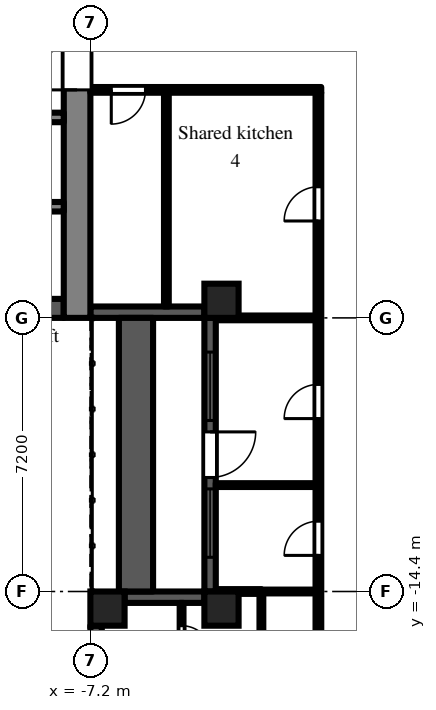
"""IFC4 building model, lengths in metres.
Left out: names, types, materials, properties, quantities, classifications, styles, units other than length and angle.
Written with IfcOpenShell. Run it as: python <this file> out.ifc"""

import sys

from ifc_helpers import new_model, si_unit, direction, frame, frame_2d, origin, origin_2d, place, context, subcontext, project, spatial, rectangle, extrude, element, fill, save


model = new_model("IFC4")
c1 = context("Model", 3, precision=1e-05, world=origin(), true_north=direction((0.0, 1.0)))
c2 = subcontext(c1, "Body", "Model", "MODEL_VIEW")
j1 = project(units=[si_unit("LENGTHUNIT", "METRE"), si_unit("PLANEANGLEUNIT", "RADIAN")], contexts=[c1])
p1 = place(None, origin())
s1 = spatial("IfcSite", under=j1, at=p1, CompositionType="ELEMENT")
p2 = place(p1, origin())
s2 = spatial("IfcBuilding", under=s1, at=p2, CompositionType="ELEMENT")
p3 = place(p2, frame((0.0, 0.0, 69.9)))
s3 = spatial("IfcBuildingStorey", under=s2, at=p3, CompositionType="ELEMENT", Elevation=69.9)
for number, where, z_axis, x_axis in (
    (1, (-6.75, -14.85, 0.0), (0.0, 0.0, 1.0), (1.0, 0.0, 0.0)),
    (2, (-3.75, -14.85, 0.0), (0.0, 0.0, 1.0), (1.0, 0.0, 0.0)),
    (3, (-3.75, -6.75, 0.0), (0.0, 0.0, 1.0), (1.0, 0.0, 0.0)),
):
    element("IfcColumn", number, at=place(p3, frame(where, z_axis=z_axis, x_axis=x_axis)), inside=s3, PredefinedType="COLUMN", context=c2, shape_type="SweptSolid", body=[
        extrude(rectangle(XDim=0.9, YDim=0.9, at=origin_2d()), origin(), (0.0, 0.0, 1.0), 3.0),
    ])
p4 = place(p3, frame((-7.2, -7.05, 0.0), z_axis=(0.0, 0.0, 1.0), x_axis=(1.0, 0.0, 0.0)))
e4 = element("IfcWall", 4, at=p4, inside=s3, PredefinedType="SOLIDWALL", context=c2, shape_type="SweptSolid", body=[
    extrude(rectangle(XDim=3.0, YDim=0.3, at=frame_2d((1.5, 0.0))), origin(), (0.0, 0.0, 1.0), 2.1),
])
p5 = place(p3, frame((-4.05, -7.2, 0.0), z_axis=(0.0, 0.0, 1.0), x_axis=(0.0, -1.0, 0.0)))
e5 = element("IfcWall", 5, at=p5, inside=s3, PredefinedType="SOLIDWALL", context=c2, shape_type="SweptSolid", body=[
    extrude(rectangle(XDim=7.2, YDim=0.3, at=frame_2d((3.6, 0.0))), origin(), (0.0, 0.0, 1.0), 2.1),
])
p6 = place(p5, frame((3.0, 0.0, 0.0)))
e6 = element("IfcOpeningElement", 6, at=p6, cuts=e5, PredefinedType="OPENING", context=c2, shape_type="SweptSolid", body=[
    extrude(rectangle(XDim=1.2, YDim=2.05, at=frame_2d((0.6, 1.025))), frame((0.0, 0.16, 0.0), z_axis=(0.0, -1.0, 0.0), x_axis=(1.0, 0.0, 0.0)), (0.0, 0.0, 1.0), 0.32),
])
p7 = place(p5, frame((0.9, 0.0, 0.2)))
e7 = element("IfcOpeningElement", 7, at=p7, cuts=e5, PredefinedType="OPENING", context=c2, shape_type="SweptSolid", body=[
    extrude(rectangle(XDim=1.8, YDim=1.85, at=frame_2d((0.9, 0.925))), frame((0.0, 0.16, 0.0), z_axis=(0.0, -1.0, 0.0), x_axis=(1.0, 0.0, 0.0)), (0.0, 0.0, 1.0), 0.32),
])
p8 = place(p5, frame((4.5, 0.0, 0.2)))
e8 = element("IfcOpeningElement", 8, at=p8, cuts=e5, PredefinedType="OPENING", context=c2, shape_type="SweptSolid", body=[
    extrude(rectangle(XDim=1.8, YDim=1.85, at=frame_2d((0.9, 0.925))), frame((0.0, 0.16, 0.0), z_axis=(0.0, -1.0, 0.0), x_axis=(1.0, 0.0, 0.0)), (0.0, 0.0, 1.0), 0.32),
])
p9 = place(p3, frame((-4.2, -14.55, 0.0), z_axis=(0.0, 0.0, 1.0), x_axis=(-1.0, 0.0, 0.0)))
e9 = element("IfcWall", 9, at=p9, inside=s3, PredefinedType="SOLIDWALL", context=c2, shape_type="SweptSolid", body=[
    extrude(rectangle(XDim=2.1, YDim=0.3, at=frame_2d((1.05, 0.0))), origin(), (0.0, 0.0, 1.0), 2.1),
])
p10 = place(p3, frame((-7.05, -15.3, 0.0), z_axis=(0.0, 0.0, 1.0), x_axis=(0.0, -1.0, 0.0)))
e10 = element("IfcWall", 10, at=p10, inside=s3, PredefinedType="SOLIDWALL", context=c2, shape_type="SweptSolid", body=[
    extrude(rectangle(XDim=1.8, YDim=0.3, at=frame_2d((0.9, 0.0))), origin(), (0.0, 0.0, 1.0), 2.1),
])
p11 = place(p10, frame((0.3, 0.0, 0.2)))
e11 = element("IfcOpeningElement", 11, at=p11, cuts=e10, PredefinedType="OPENING", context=c2, shape_type="SweptSolid", body=[
    extrude(rectangle(XDim=1.2, YDim=1.85, at=frame_2d((0.6, 0.925))), frame((0.0, 0.16, 0.0), z_axis=(0.0, -1.0, 0.0), x_axis=(1.0, 0.0, 0.0)), (0.0, 0.0, 1.0), 0.32),
])
p12 = place(p3, frame((-6.0, -14.4, 0.0), z_axis=(0.0, 0.0, 1.0), x_axis=(0.0, 1.0, 0.0)))
e12 = element("IfcWall", 12, at=p12, inside=s3, PredefinedType="PARAPET", context=c2, shape_type="SweptSolid", body=[
    extrude(rectangle(XDim=7.2, YDim=0.9, at=frame_2d((3.6, 0.0))), origin(), (0.0, 0.0, 1.0), 0.8),
])
p13 = place(p3, frame((-7.55, -7.2, 0.0), z_axis=(0.0, 0.0, 1.0), x_axis=(0.0, 1.0, 0.0)))
e13 = element("IfcWall", 13, at=p13, inside=s3, PredefinedType="SHEAR", context=c2, shape_type="SweptSolid", body=[
    extrude(rectangle(XDim=14.4, YDim=0.7, at=frame_2d((7.2, 0.0))), origin(), (0.0, 0.0, 1.0), 2.575),
])
p14 = place(p13, frame((6.0, 0.0, 0.0)))
e14 = element("IfcOpeningElement", 14, at=p14, cuts=e13, PredefinedType="OPENING", context=c2, shape_type="SweptSolid", body=[
    extrude(rectangle(XDim=2.4, YDim=2.2, at=frame_2d((1.2, 1.1))), frame((0.0, 0.36, 0.0), z_axis=(0.0, -1.0, 0.0), x_axis=(1.0, 0.0, 0.0)), (0.0, 0.0, 1.0), 0.72),
])
p15 = place(p3, frame((-7.9, -6.95, 0.0), z_axis=(0.0, 0.0, 1.0), x_axis=(-1.0, 0.0, 0.0)))
e15 = element("IfcWall", 15, at=p15, inside=s3, PredefinedType="SHEAR", context=c2, shape_type="SweptSolid", body=[
    extrude(rectangle(XDim=12.95, YDim=0.5, at=frame_2d((6.475, 0.0))), origin(), (0.0, 0.0, 1.0), 2.575),
])
p16 = place(p3, frame((-7.9, -1.925, 0.0), z_axis=(0.0, 0.0, 1.0), x_axis=(-1.0, 0.0, 0.0)))
e16 = element("IfcWall", 16, at=p16, inside=s3, PredefinedType="SHEAR", context=c2, shape_type="SweptSolid", body=[
    extrude(rectangle(XDim=12.95, YDim=0.25, at=frame_2d((6.475, 0.0))), origin(), (0.0, 0.0, 1.0), 2.575),
])
p17 = place(p16, frame((4.825, 0.0, 0.0)))
e17 = element("IfcOpeningElement", 17, at=p17, cuts=e16, PredefinedType="OPENING", context=c2, shape_type="SweptSolid", body=[
    extrude(rectangle(XDim=1.1, YDim=2.1, at=frame_2d((0.55, 1.05))), frame((0.0, 0.135, 0.0), z_axis=(0.0, -1.0, 0.0), x_axis=(1.0, 0.0, 0.0)), (0.0, 0.0, 1.0), 0.27),
])
p18 = place(p16, frame((7.025, 0.0, 0.0)))
e18 = element("IfcOpeningElement", 18, at=p18, cuts=e16, PredefinedType="OPENING", context=c2, shape_type="SweptSolid", body=[
    extrude(rectangle(XDim=1.1, YDim=2.1, at=frame_2d((0.55, 1.05))), frame((0.0, 0.135, 0.0), z_axis=(0.0, -1.0, 0.0), x_axis=(1.0, 0.0, 0.0)), (0.0, 0.0, 1.0), 0.27),
])
p19 = place(p16, frame((9.225, 0.0, 0.0)))
e19 = element("IfcOpeningElement", 19, at=p19, cuts=e16, PredefinedType="OPENING", context=c2, shape_type="SweptSolid", body=[
    extrude(rectangle(XDim=1.1, YDim=2.1, at=frame_2d((0.55, 1.05))), frame((0.0, 0.135, 0.0), z_axis=(0.0, -1.0, 0.0), x_axis=(1.0, 0.0, 0.0)), (0.0, 0.0, 1.0), 0.27),
])
p20 = place(p16, frame((0.525, 0.0, 0.0)))
e20 = element("IfcOpeningElement", 20, at=p20, cuts=e16, PredefinedType="OPENING", context=c2, shape_type="SweptSolid", body=[
    extrude(rectangle(XDim=0.9, YDim=2.1, at=frame_2d((0.45, 1.05))), frame((0.0, 0.135, 0.0), z_axis=(0.0, -1.0, 0.0), x_axis=(1.0, 0.0, 0.0)), (0.0, 0.0, 1.0), 0.27),
])
p21 = place(p16, frame((2.625, 0.0, 0.0)))
e21 = element("IfcOpeningElement", 21, at=p21, cuts=e16, PredefinedType="OPENING", context=c2, shape_type="SweptSolid", body=[
    extrude(rectangle(XDim=1.1, YDim=2.1, at=frame_2d((0.55, 1.05))), frame((0.0, 0.135, 0.0), z_axis=(0.0, -1.0, 0.0), x_axis=(1.0, 0.0, 0.0)), (0.0, 0.0, 1.0), 0.27),
])
p22 = place(p3, frame((-7.9, -4.275, 0.0), z_axis=(0.0, 0.0, 1.0), x_axis=(-1.0, 0.0, 0.0)))
e22 = element("IfcWall", 22, at=p22, inside=s3, PredefinedType="SHEAR", context=c2, shape_type="SweptSolid", body=[
    extrude(rectangle(XDim=1.95, YDim=0.25, at=frame_2d((0.975, 0.0))), origin(), (0.0, 0.0, 1.0), 2.575),
])
p23 = place(p3, frame((-7.2, -1.2, 0.0), z_axis=(0.0, 0.0, 1.0), x_axis=(1.0, 0.0, 0.0)))
e23 = element("IfcWall", 23, at=p23, inside=s3, PredefinedType="PARTITIONING", context=c2, shape_type="SweptSolid", body=[
    extrude(rectangle(XDim=6.075, YDim=0.15, at=frame_2d((3.038, 0.0))), origin(), (0.0, 0.0, 1.0), 2.575),
])
p24 = place(p23, frame((0.55, 0.0, 0.0)))
e24 = element("IfcOpeningElement", 24, at=p24, cuts=e23, PredefinedType="OPENING", context=c2, shape_type="SweptSolid", body=[
    extrude(rectangle(XDim=0.9, YDim=2.1, at=frame_2d((0.45, 1.05))), frame((0.0, 0.085, 0.0), z_axis=(0.0, -1.0, 0.0), x_axis=(1.0, 0.0, 0.0)), (0.0, 0.0, 1.0), 0.17),
])
p25 = place(p3, frame((-5.2, -6.9, 0.0), z_axis=(0.0, 0.0, 1.0), x_axis=(0.0, 1.0, 0.0)))
e25 = element("IfcWall", 25, at=p25, inside=s3, PredefinedType="PARTITIONING", context=c2, shape_type="SweptSolid", body=[
    extrude(rectangle(XDim=5.625, YDim=0.125, at=frame_2d((2.812, 0.0))), origin(), (0.0, 0.0, 1.0), 2.575),
])
p26 = place(p3, frame((-4.8, -16.25, 0.0), z_axis=(0.0, 0.0, 1.0), x_axis=(0.0, 1.0, 0.0)))
e26 = element("IfcWall", 26, at=p26, inside=s3, PredefinedType="PARTITIONING", context=c2, shape_type="SweptSolid", body=[
    extrude(rectangle(XDim=1.55, YDim=0.1, at=frame_2d((0.775, 0.0))), origin(), (0.0, 0.0, 1.0), 2.575),
])
p27 = place(p26, frame((0.15, 0.0, 0.0)))
e27 = element("IfcOpeningElement", 27, at=p27, cuts=e26, PredefinedType="OPENING", context=c2, shape_type="SweptSolid", body=[
    extrude(rectangle(XDim=0.8, YDim=2.1, at=frame_2d((0.4, 1.05))), frame((0.0, 0.06, 0.0), z_axis=(0.0, -1.0, 0.0), x_axis=(1.0, 0.0, 0.0)), (0.0, 0.0, 1.0), 0.12),
])
p28 = place(p3, frame((-3.9, -14.4, 0.0), z_axis=(0.0, 0.0, 1.0), x_axis=(1.0, 0.0, 0.0)))
e28 = element("IfcWall", 28, at=p28, inside=s3, PredefinedType="PARTITIONING", context=c2, shape_type="SweptSolid", body=[
    extrude(rectangle(XDim=1.2, YDim=0.125, at=frame_2d((0.6, 0.0))), origin(), (0.0, 0.0, 1.0), 2.575),
])
p29 = place(p3, frame((-3.9, -11.6, 0.0), z_axis=(0.0, 0.0, 1.0), x_axis=(1.0, 0.0, 0.0)))
e29 = element("IfcWall", 29, at=p29, inside=s3, PredefinedType="PARTITIONING", context=c2, shape_type="SweptSolid", body=[
    extrude(rectangle(XDim=2.625, YDim=0.1, at=frame_2d((1.312, 0.0))), origin(), (0.0, 0.0, 1.0), 2.575),
])
p30 = place(p3, frame((-3.9, -7.2, 0.0), z_axis=(0.0, 0.0, 1.0), x_axis=(1.0, 0.0, 0.0)))
e30 = element("IfcWall", 30, at=p30, inside=s3, PredefinedType="PARTITIONING", context=c2, shape_type="SweptSolid", body=[
    extrude(rectangle(XDim=2.625, YDim=0.125, at=frame_2d((1.312, 0.0))), origin(), (0.0, 0.0, 1.0), 2.575),
])
p31 = place(p3, frame((-2.7, -32.35, 0.0), z_axis=(0.0, 0.0, 1.0), x_axis=(0.0, 1.0, 0.0)))
e31 = element("IfcWall", 31, at=p31, inside=s3, PredefinedType="PARTITIONING", context=c2, shape_type="SweptSolid", body=[
    extrude(rectangle(XDim=17.888, YDim=0.1, at=frame_2d((8.944, 0.0))), origin(), (0.0, 0.0, 1.0), 2.575),
])
p32 = place(p31, frame((2.2, 0.0, 0.0)))
e32 = element("IfcOpeningElement", 32, at=p32, cuts=e31, PredefinedType="OPENING", context=c2, shape_type="SweptSolid", body=[
    extrude(rectangle(XDim=0.9, YDim=2.1, at=frame_2d((0.45, 1.05))), frame((0.0, 0.06, 0.0), z_axis=(0.0, -1.0, 0.0), x_axis=(1.0, 0.0, 0.0)), (0.0, 0.0, 1.0), 0.12),
])
p33 = place(p31, frame((4.0, 0.0, 0.0)))
e33 = element("IfcOpeningElement", 33, at=p33, cuts=e31, PredefinedType="OPENING", context=c2, shape_type="SweptSolid", body=[
    extrude(rectangle(XDim=0.9, YDim=2.1, at=frame_2d((0.45, 1.05))), frame((0.0, 0.06, 0.0), z_axis=(0.0, -1.0, 0.0), x_axis=(1.0, 0.0, 0.0)), (0.0, 0.0, 1.0), 0.12),
])
p34 = place(p31, frame((9.4, 0.0, 0.0)))
e34 = element("IfcOpeningElement", 34, at=p34, cuts=e31, PredefinedType="OPENING", context=c2, shape_type="SweptSolid", body=[
    extrude(rectangle(XDim=0.9, YDim=2.1, at=frame_2d((0.45, 1.05))), frame((0.0, 0.06, 0.0), z_axis=(0.0, -1.0, 0.0), x_axis=(1.0, 0.0, 0.0)), (0.0, 0.0, 1.0), 0.12),
])
p35 = place(p31, frame((11.2, 0.0, 0.0)))
e35 = element("IfcOpeningElement", 35, at=p35, cuts=e31, PredefinedType="OPENING", context=c2, shape_type="SweptSolid", body=[
    extrude(rectangle(XDim=0.9, YDim=2.1, at=frame_2d((0.45, 1.05))), frame((0.0, 0.06, 0.0), z_axis=(0.0, -1.0, 0.0), x_axis=(1.0, 0.0, 0.0)), (0.0, 0.0, 1.0), 0.12),
])
p36 = place(p31, frame((14.8, 0.0, 0.0)))
e36 = element("IfcOpeningElement", 36, at=p36, cuts=e31, PredefinedType="OPENING", context=c2, shape_type="SweptSolid", body=[
    extrude(rectangle(XDim=0.9, YDim=2.1, at=frame_2d((0.45, 1.05))), frame((0.0, 0.06, 0.0), z_axis=(0.0, -1.0, 0.0), x_axis=(1.0, 0.0, 0.0)), (0.0, 0.0, 1.0), 0.12),
])
p37 = place(p3, frame((-2.7, -14.4, 0.0), z_axis=(0.0, 0.0, 1.0), x_axis=(1.0, 0.0, 0.0)))
e37 = element("IfcWall", 37, at=p37, inside=s3, PredefinedType="PARTITIONING", context=c2, shape_type="SweptSolid", body=[
    extrude(rectangle(XDim=1.425, YDim=0.1, at=frame_2d((0.712, 0.0))), origin(), (0.0, 0.0, 1.0), 2.575),
])
p38 = place(p3, frame((-1.2, -36.5, 0.0), z_axis=(0.0, 0.0, 1.0), x_axis=(0.0, 1.0, 0.0)))
e38 = element("IfcWall", 38, at=p38, inside=s3, PredefinedType="PARTITIONING", context=c2, shape_type="SweptSolid", body=[
    extrude(rectangle(XDim=35.225, YDim=0.15, at=frame_2d((17.613, 0.0))), origin(), (0.0, 0.0, 1.0), 2.575),
])
p39 = place(p38, frame((31.85, 0.0, 0.0)))
e39 = element("IfcOpeningElement", 39, at=p39, cuts=e38, PredefinedType="OPENING", context=c2, shape_type="SweptSolid", body=[
    extrude(rectangle(XDim=0.9, YDim=2.1, at=frame_2d((0.45, 1.05))), frame((0.0, 0.085, 0.0), z_axis=(0.0, -1.0, 0.0), x_axis=(1.0, 0.0, 0.0)), (0.0, 0.0, 1.0), 0.17),
])
p40 = place(p38, frame((23.05, 0.0, 0.0)))
e40 = element("IfcOpeningElement", 40, at=p40, cuts=e38, PredefinedType="OPENING", context=c2, shape_type="SweptSolid", body=[
    extrude(rectangle(XDim=0.9, YDim=2.1, at=frame_2d((0.45, 1.05))), frame((0.0, 0.085, 0.0), z_axis=(0.0, -1.0, 0.0), x_axis=(1.0, 0.0, 0.0)), (0.0, 0.0, 1.0), 0.17),
])
p41 = place(p38, frame((26.65, 0.0, 0.0)))
e41 = element("IfcOpeningElement", 41, at=p41, cuts=e38, PredefinedType="OPENING", context=c2, shape_type="SweptSolid", body=[
    extrude(rectangle(XDim=0.9, YDim=2.1, at=frame_2d((0.45, 1.05))), frame((0.0, 0.085, 0.0), z_axis=(0.0, -1.0, 0.0), x_axis=(1.0, 0.0, 0.0)), (0.0, 0.0, 1.0), 0.17),
])
p42 = place(p38, frame((1.55, 0.0, 0.0)))
e42 = element("IfcOpeningElement", 42, at=p42, cuts=e38, PredefinedType="OPENING", context=c2, shape_type="SweptSolid", body=[
    extrude(rectangle(XDim=1.0, YDim=2.1, at=frame_2d((0.5, 1.05))), frame((0.0, 0.085, 0.0), z_axis=(0.0, -1.0, 0.0), x_axis=(1.0, 0.0, 0.0)), (0.0, 0.0, 1.0), 0.17),
])
p43 = place(p6, origin())
e43 = element("IfcDoor", 43, at=p43, inside=s3, OperationType="SINGLE_SWING_LEFT", PredefinedType="DOOR", context=c2, shape_type="SweptSolid", body=[
    extrude(rectangle(XDim=1.2, YDim=2.05, at=frame_2d((0.6, 1.025))), frame((0.0, 0.025, 0.0), z_axis=(0.0, -1.0, 0.0), x_axis=(1.0, 0.0, 0.0)), (0.0, 0.0, 1.0), 0.05),
])
fill(e6, e43)
p44 = place(p7, origin())
e44 = element("IfcWindow", 44, at=p44, inside=s3, PartitioningType="SINGLE_PANEL", PredefinedType="WINDOW", context=c2, shape_type="SweptSolid", body=[
    extrude(rectangle(XDim=1.8, YDim=1.85, at=frame_2d((0.9, 0.925))), frame((0.0, 0.03, 0.0), z_axis=(0.0, -1.0, 0.0), x_axis=(1.0, 0.0, 0.0)), (0.0, 0.0, 1.0), 0.06),
])
fill(e7, e44)
p45 = place(p8, origin())
e45 = element("IfcWindow", 45, at=p45, inside=s3, PartitioningType="SINGLE_PANEL", PredefinedType="WINDOW", context=c2, shape_type="SweptSolid", body=[
    extrude(rectangle(XDim=1.8, YDim=1.85, at=frame_2d((0.9, 0.925))), frame((0.0, 0.03, 0.0), z_axis=(0.0, -1.0, 0.0), x_axis=(1.0, 0.0, 0.0)), (0.0, 0.0, 1.0), 0.06),
])
fill(e8, e45)
p46 = place(p14, origin())
e46 = element("IfcDoor", 46, at=p46, inside=s3, OperationType="DOUBLE_DOOR_DOUBLE_SWING", PredefinedType="DOOR", context=c2, shape_type="SweptSolid", body=[
    extrude(rectangle(XDim=2.4, YDim=2.2, at=frame_2d((1.2, 1.1))), frame((0.0, 0.025, 0.0), z_axis=(0.0, -1.0, 0.0), x_axis=(1.0, 0.0, 0.0)), (0.0, 0.0, 1.0), 0.05),
])
fill(e14, e46)
p47 = place(p39, origin())
e47 = element("IfcDoor", 47, at=p47, inside=s3, OperationType="SINGLE_SWING_LEFT", PredefinedType="DOOR", context=c2, shape_type="SweptSolid", body=[
    extrude(rectangle(XDim=0.9, YDim=2.1, at=frame_2d((0.45, 1.05))), frame((0.0, 0.025, 0.0), z_axis=(0.0, -1.0, 0.0), x_axis=(1.0, 0.0, 0.0)), (0.0, 0.0, 1.0), 0.05),
])
fill(e39, e47)
p48 = place(p24, frame((0.9, 0.0, 0.0), z_axis=(0.0, 0.0, 1.0), x_axis=(-1.0, 0.0, 0.0)))
e48 = element("IfcDoor", 48, at=p48, inside=s3, OperationType="SINGLE_SWING_RIGHT", PredefinedType="DOOR", context=c2, shape_type="SweptSolid", body=[
    extrude(rectangle(XDim=0.9, YDim=2.1, at=frame_2d((0.45, 1.05))), frame((0.0, 0.025, 0.0), z_axis=(0.0, -1.0, 0.0), x_axis=(1.0, 0.0, 0.0)), (0.0, 0.0, 1.0), 0.05),
])
fill(e24, e48)
p49 = place(p40, origin())
e49 = element("IfcDoor", 49, at=p49, inside=s3, OperationType="SINGLE_SWING_LEFT", PredefinedType="DOOR", context=c2, shape_type="SweptSolid", body=[
    extrude(rectangle(XDim=0.9, YDim=2.1, at=frame_2d((0.45, 1.05))), frame((0.0, 0.025, 0.0), z_axis=(0.0, -1.0, 0.0), x_axis=(1.0, 0.0, 0.0)), (0.0, 0.0, 1.0), 0.05),
])
fill(e40, e49)
p50 = place(p41, origin())
e50 = element("IfcDoor", 50, at=p50, inside=s3, OperationType="SINGLE_SWING_LEFT", PredefinedType="DOOR", context=c2, shape_type="SweptSolid", body=[
    extrude(rectangle(XDim=0.9, YDim=2.1, at=frame_2d((0.45, 1.05))), frame((0.0, 0.025, 0.0), z_axis=(0.0, -1.0, 0.0), x_axis=(1.0, 0.0, 0.0)), (0.0, 0.0, 1.0), 0.05),
])
fill(e41, e50)
p51 = place(p27, frame((0.8, 0.0, 0.0), z_axis=(0.0, 0.0, 1.0), x_axis=(-1.0, 0.0, 0.0)))
e51 = element("IfcDoor", 51, at=p51, inside=s3, OperationType="SINGLE_SWING_RIGHT", PredefinedType="DOOR", context=c2, shape_type="SweptSolid", body=[
    extrude(rectangle(XDim=0.8, YDim=2.1, at=frame_2d((0.4, 1.05))), frame((0.0, 0.025, 0.0), z_axis=(0.0, -1.0, 0.0), x_axis=(1.0, 0.0, 0.0)), (0.0, 0.0, 1.0), 0.05),
])
fill(e27, e51)
save(model, sys.argv[1])
